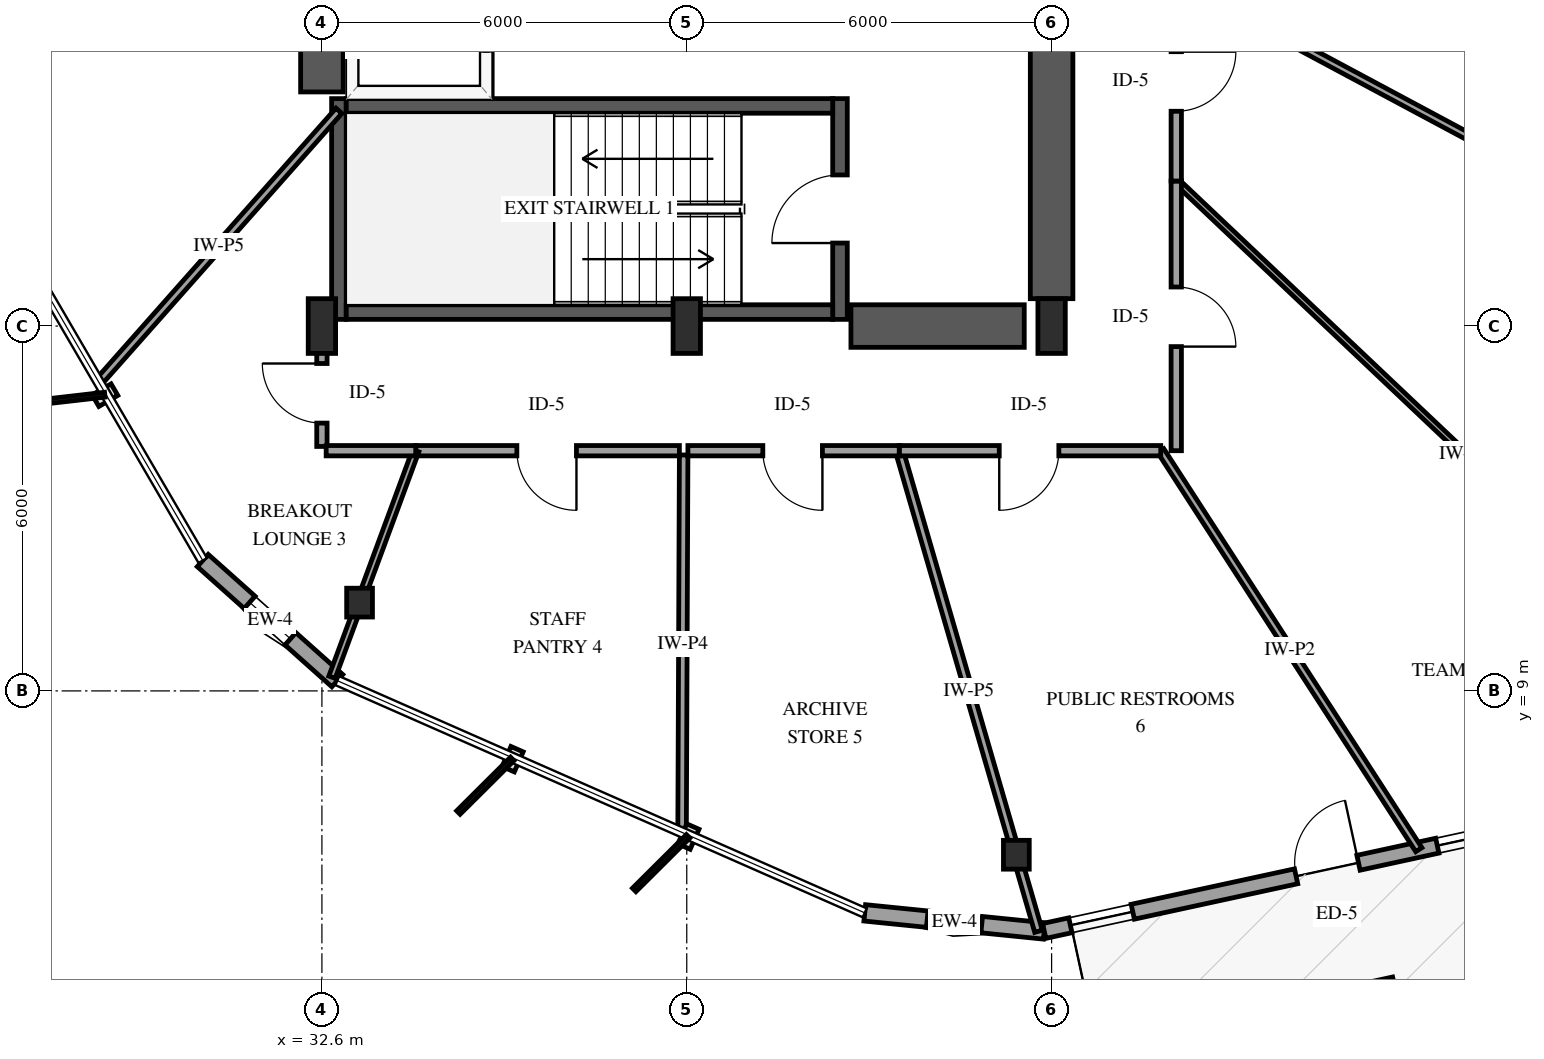
"""IFC4 building model, lengths in metres.
Left out: names, types, materials, properties, quantities, classifications, styles, units other than length and angle.
Written with IfcOpenShell. Run it as: python <this file> out.ifc"""

import sys

from ifc_helpers import new_model, si_unit, direction, frame, frame_2d, origin, origin_2d, place, context, subcontext, project, spatial, rectangle, i_section, extrude, element, fill, save


model = new_model("IFC4")
c1 = context("Model", 3, precision=1e-05, world=origin(), true_north=direction((0.0, 1.0)))
c2 = subcontext(c1, "Body", "Model", "MODEL_VIEW")
j1 = project(units=[si_unit("LENGTHUNIT", "METRE"), si_unit("PLANEANGLEUNIT", "RADIAN")], contexts=[c1])
p1 = place(None, origin())
s1 = spatial("IfcSite", under=j1, at=p1, CompositionType="ELEMENT")
p2 = place(p1, origin())
s2 = spatial("IfcBuilding", under=s1, at=p2, CompositionType="ELEMENT")
p3 = place(p2, frame((0.0, 0.0, 74.6)))
s3 = spatial("IfcBuildingStorey", under=s2, at=p3, CompositionType="ELEMENT", Elevation=74.6)
p4 = place(p3, frame((32.88, 15.11, 0.0), z_axis=(0.0, 0.0, 1.0), x_axis=(0.0, 1.0, 0.0)))
e1 = element("IfcWall", 1, at=p4, inside=s3, PredefinedType="SHEAR", context=c2, shape_type="SweptSolid", body=[
    extrude(rectangle(XDim=3.63, YDim=0.24, at=frame_2d((1.815, 0.0))), origin(), (0.0, 0.0, 1.0), 4.0),
])
p5 = place(p3, frame((41.12, 15.11, 0.0), z_axis=(0.0, 0.0, 1.0), x_axis=(0.0, 1.0, 0.0)))
e2 = element("IfcWall", 2, at=p5, inside=s3, PredefinedType="SHEAR", context=c2, shape_type="SweptSolid", body=[
    extrude(rectangle(XDim=3.63, YDim=0.24, at=frame_2d((1.815, 0.0))), origin(), (0.0, 0.0, 1.0), 4.0),
])
p6 = place(p5, frame((1.255, 0.0, 0.0)))
e3 = element("IfcOpeningElement", 3, at=p6, cuts=e2, PredefinedType="OPENING", context=c2, shape_type="SweptSolid", body=[
    extrude(rectangle(XDim=1.12, YDim=2.15, at=frame_2d((0.56, 1.075))), frame((0.0, 0.13, 0.0), z_axis=(0.0, -1.0, 0.0), x_axis=(1.0, 0.0, 0.0)), (0.0, 0.0, 1.0), 0.26),
])
for number, where, z_axis, x_axis in (
    (4, (33.0, 15.23, 0.0), (0.0, 0.0, 1.0), (1.0, 0.0, 0.0)),
    (5, (33.0, 18.62, 0.0), (0.0, 0.0, 1.0), (1.0, 0.0, 0.0)),
):
    element("IfcWall", number, at=place(p3, frame(where, z_axis=z_axis, x_axis=x_axis)), inside=s3, PredefinedType="SHEAR", context=c2, shape_type="SweptSolid", body=[
        extrude(rectangle(XDim=8.0, YDim=0.24, at=frame_2d((4.0, 0.0))), origin(), (0.0, 0.0, 1.0), 4.0),
    ])
p7 = place(p3, frame((32.6, 18.85, 0.0), z_axis=(0.0, 0.0, 1.0), x_axis=(0.0, 1.0, 0.0)))
e6 = element("IfcWall", 6, at=p7, inside=s3, PredefinedType="SHEAR", context=c2, shape_type="SweptSolid", body=[
    extrude(rectangle(XDim=12.3, YDim=0.7, at=frame_2d((6.15, 0.0))), origin(), (0.0, 0.0, 1.0), 4.0),
])
p8 = place(p3, frame((41.3, 15.0, 0.0), z_axis=(0.0, 0.0, 1.0), x_axis=(1.0, 0.0, 0.0)))
e7 = element("IfcWall", 7, at=p8, inside=s3, PredefinedType="SHEAR", context=c2, shape_type="SweptSolid", body=[
    extrude(rectangle(XDim=2.85, YDim=0.7, at=frame_2d((1.425, 0.0))), origin(), (0.0, 0.0, 1.0), 4.0),
])
p9 = place(p3, frame((44.6, 15.45, 0.0), z_axis=(0.0, 0.0, 1.0), x_axis=(0.0, 1.0, 0.0)))
e8 = element("IfcWall", 8, at=p9, inside=s3, PredefinedType="SHEAR", context=c2, shape_type="SweptSolid", body=[
    extrude(rectangle(XDim=6.35, YDim=0.7, at=frame_2d((3.175, 0.0))), origin(), (0.0, 0.0, 1.0), 4.0),
])
for number, where, z_axis, x_axis in (
    (9, (32.6, 15.0, 0.0), (0.0, 0.0, 1.0), (1.0, 0.0, 0.0)),
    (10, (38.6, 15.0, 0.0), (0.0, 0.0, 1.0), (1.0, 0.0, 0.0)),
    (11, (44.6, 15.0, 0.0), (0.0, 0.0, 1.0), (1.0, 0.0, 0.0)),
):
    element("IfcColumn", number, at=place(p3, frame(where, z_axis=z_axis, x_axis=x_axis)), inside=s3, PredefinedType="PILASTER", context=c2, shape_type="SweptSolid", body=[
        extrude(rectangle(XDim=0.45, YDim=0.9, at=origin_2d()), origin(), (0.0, 0.0, 1.0), 4.0),
    ])
for number, where, z_axis, x_axis in (
    (12, (33.219, 10.452, 0.0), (0.0, 0.0, 1.0), (1.0, 0.0, 0.0)),
    (13, (44.02, 6.306, 0.0), (0.0, 0.0, 1.0), (1.0, 0.0, 0.0)),
):
    element("IfcColumn", number, at=place(p3, frame(where, z_axis=z_axis, x_axis=x_axis)), inside=s3, PredefinedType="COLUMN", context=c2, shape_type="SweptSolid", body=[
        extrude(i_section(OverallWidth=0.424, OverallDepth=0.474, WebThickness=0.048, FlangeThickness=0.077, FilletRadius=0.038, at=origin_2d()), origin(), (0.0, 0.0, 1.0), 4.0),
    ])
p10 = place(p3, frame((30.64, 11.144, 0.0), z_axis=(0.0, 0.0, 1.0), x_axis=(0.745968322864, -0.665981427131, 0.0)))
e14 = element("IfcWall", 14, at=p10, inside=s3, PredefinedType="SOLIDWALL", context=c2, shape_type="SweptSolid", body=[
    extrude(rectangle(XDim=2.967, YDim=0.27, at=frame_2d((1.483, 0.0))), origin(), (0.0, 0.0, 1.0), 3.079),
])
p11 = place(p10, frame((1.033, 0.0, 0.75)))
e15 = element("IfcOpeningElement", 15, at=p11, cuts=e14, PredefinedType="OPENING", context=c2, shape_type="SweptSolid", body=[
    extrude(rectangle(XDim=0.9, YDim=1.5, at=frame_2d((0.45, 0.75))), frame((0.0, 0.145, 0.0), z_axis=(0.0, -1.0, 0.0), x_axis=(1.0, 0.0, 0.0)), (0.0, 0.0, 1.0), 0.29),
])
p12 = place(p3, frame((41.527, 5.35, 0.0), z_axis=(0.0, 0.0, 1.0), x_axis=(0.994955375676, -0.100318494868, 0.0)))
e16 = element("IfcWall", 16, at=p12, inside=s3, PredefinedType="SOLIDWALL", context=c2, shape_type="SweptSolid", body=[
    extrude(rectangle(XDim=2.967, YDim=0.27, at=frame_2d((1.483, 0.0))), origin(), (0.0, 0.0, 1.0), 3.079),
])
p13 = place(p12, frame((1.033, 0.0, 0.75)))
e17 = element("IfcOpeningElement", 17, at=p13, cuts=e16, PredefinedType="OPENING", context=c2, shape_type="SweptSolid", body=[
    extrude(rectangle(XDim=0.9, YDim=1.5, at=frame_2d((0.45, 0.75))), frame((0.0, 0.145, 0.0), z_axis=(0.0, -1.0, 0.0), x_axis=(1.0, 0.0, 0.0)), (0.0, 0.0, 1.0), 0.29),
])
p14 = place(p3, frame((44.479, 5.052, 0.0), z_axis=(0.0, 0.0, 1.0), x_axis=(0.977271129169, 0.211993254829, 0.0)))
e18 = element("IfcWall", 18, at=p14, inside=s3, PredefinedType="SOLIDWALL", context=c2, shape_type="SweptSolid", body=[
    extrude(rectangle(XDim=9.477, YDim=0.25, at=frame_2d((4.738, 0.0))), origin(), (0.0, 0.0, 1.0), 3.079),
])
p15 = place(p14, frame((4.239, 0.0, 0.0)))
e19 = element("IfcOpeningElement", 19, at=p15, cuts=e18, PredefinedType="OPENING", context=c2, shape_type="SweptSolid", body=[
    extrude(rectangle(XDim=1.05, YDim=2.15, at=frame_2d((0.525, 1.075))), frame((0.0, 0.135, 0.0), z_axis=(0.0, -1.0, 0.0), x_axis=(1.0, 0.0, 0.0)), (0.0, 0.0, 1.0), 0.27),
])
p16 = place(p14, frame((0.44, 0.0, 0.72)))
e20 = element("IfcOpeningElement", 20, at=p16, cuts=e18, PredefinedType="OPENING", context=c2, shape_type="SweptSolid", body=[
    extrude(rectangle(XDim=1.05, YDim=1.55, at=frame_2d((0.525, 0.775))), frame((0.0, 0.135, 0.0), z_axis=(0.0, -1.0, 0.0), x_axis=(1.0, 0.0, 0.0)), (0.0, 0.0, 1.0), 0.27),
])
p17 = place(p14, frame((6.615, 0.0, 0.72)))
e21 = element("IfcOpeningElement", 21, at=p17, cuts=e18, PredefinedType="OPENING", context=c2, shape_type="SweptSolid", body=[
    extrude(rectangle(XDim=1.05, YDim=1.55, at=frame_2d((0.525, 0.775))), frame((0.0, 0.135, 0.0), z_axis=(0.0, -1.0, 0.0), x_axis=(1.0, 0.0, 0.0)), (0.0, 0.0, 1.0), 0.27),
])
p18 = place(p3, frame((35.3, 18.79, 0.0), z_axis=(0.0, 0.0, 1.0), x_axis=(0.0, 1.0, 0.0)))
e22 = element("IfcWall", 22, at=p18, inside=s3, PredefinedType="SOLIDWALL", context=c2, shape_type="SweptSolid", body=[
    extrude(rectangle(XDim=2.55, YDim=0.2, at=frame_2d((1.275, 0.0))), origin(), (0.0, 0.0, 1.0), 3.7),
])
p19 = place(p18, frame((0.725, 0.0, 0.0)))
e23 = element("IfcOpeningElement", 23, at=p19, cuts=e22, PredefinedType="OPENING", context=c2, shape_type="SweptSolid", body=[
    extrude(rectangle(XDim=1.1, YDim=2.15, at=frame_2d((0.55, 1.075))), frame((0.0, 0.11, 0.0), z_axis=(0.0, -1.0, 0.0), x_axis=(1.0, 0.0, 0.0)), (0.0, 0.0, 1.0), 0.22),
])
p20 = place(p3, frame((46.65, 22.738, 0.0), z_axis=(0.0, 0.0, 1.0), x_axis=(0.96272520574, -0.270481382415, 0.0)))
e24 = element("IfcWall", 24, at=p20, inside=s3, PredefinedType="PARTITIONING", context=c2, shape_type="SweptSolid", body=[
    extrude(rectangle(XDim=17.717, YDim=0.14, at=frame_2d((8.858, 0.0))), origin(), (0.0, 0.0, 1.0), 2.995),
])
p21 = place(p3, frame((46.65, 20.689, 0.0), z_axis=(0.0, 0.0, 1.0), x_axis=(0.881603902275, -0.471989999358, 0.0)))
e25 = element("IfcWall", 25, at=p21, inside=s3, PredefinedType="PARTITIONING", context=c2, shape_type="SweptSolid", body=[
    extrude(rectangle(XDim=15.723, YDim=0.12, at=frame_2d((7.861, 0.0))), origin(), (0.0, 0.0, 1.0), 3.7),
])
p22 = place(p3, frame((46.65, 17.385, 0.0), z_axis=(0.0, 0.0, 1.0), x_axis=(0.726419957341, -0.687251078993, 0.0)))
e26 = element("IfcWall", 26, at=p22, inside=s3, PredefinedType="PARTITIONING", context=c2, shape_type="SweptSolid", body=[
    extrude(rectangle(XDim=13.052, YDim=0.1, at=frame_2d((6.526, 0.0))), origin(), (0.0, 0.0, 1.0), 2.995),
])
p23 = place(p3, frame((42.094, 12.95, 0.0), z_axis=(0.0, 0.0, 1.0), x_axis=(0.278434130026, -0.960455327039, 0.0)))
e27 = element("IfcWall", 27, at=p23, inside=s3, PredefinedType="PARTITIONING", context=c2, shape_type="SweptSolid", body=[
    extrude(rectangle(XDim=8.228, YDim=0.13, at=frame_2d((4.114, 0.0))), origin(), (0.0, 0.0, 1.0), 2.995),
])
p24 = place(p3, frame((46.395, 12.95, 0.0), z_axis=(0.0, 0.0, 1.0), x_axis=(0.543117835723, -0.839656487213, 0.0)))
e28 = element("IfcWall", 28, at=p24, inside=s3, PredefinedType="PARTITIONING", context=c2, shape_type="SweptSolid", body=[
    extrude(rectangle(XDim=7.814, YDim=0.12, at=frame_2d((3.907, 0.0))), origin(), (0.0, 0.0, 1.0), 3.7),
])
p25 = place(p3, frame((38.549, 12.88, 0.0), z_axis=(0.0, 0.0, 1.0), x_axis=(-0.004208750042, -0.999991143172, 0.0)))
e29 = element("IfcWall", 29, at=p25, inside=s3, PredefinedType="PARTITIONING", context=c2, shape_type="SweptSolid", body=[
    extrude(rectangle(XDim=6.207, YDim=0.14, at=frame_2d((3.104, 0.0))), origin(), (0.0, 0.0, 1.0), 3.7),
])
p26 = place(p3, frame((32.88, 18.54, 0.0), z_axis=(0.0, 0.0, 1.0), x_axis=(-0.663098879781, -0.748531813374, 0.0)))
e30 = element("IfcWall", 30, at=p26, inside=s3, PredefinedType="PARTITIONING", context=c2, shape_type="SweptSolid", body=[
    extrude(rectangle(XDim=5.958, YDim=0.13, at=frame_2d((2.979, 0.0))), origin(), (0.0, 0.0, 1.0), 3.7),
])
p27 = place(p3, frame((46.65, 17.385, 0.0), z_axis=(0.0, 0.0, 1.0), x_axis=(0.0, -1.0, 0.0)))
e31 = element("IfcWall", 31, at=p27, inside=s3, PredefinedType="PARTITIONING", context=c2, shape_type="SweptSolid", body=[
    extrude(rectangle(XDim=4.435, YDim=0.17, at=frame_2d((2.218, 0.0))), origin(), (0.0, 0.0, 1.0), 3.7),
])
p28 = place(p27, frame((1.743, 0.0, 0.0)))
e32 = element("IfcOpeningElement", 32, at=p28, cuts=e31, PredefinedType="OPENING", context=c2, shape_type="SweptSolid", body=[
    extrude(rectangle(XDim=0.98, YDim=2.15, at=frame_2d((0.49, 1.075))), frame((0.0, 0.095, 0.0), z_axis=(0.0, -1.0, 0.0), x_axis=(1.0, 0.0, 0.0)), (0.0, 0.0, 1.0), 0.19),
])
p29 = place(p3, frame((38.479, 12.95, 0.0), z_axis=(0.0, 0.0, 1.0), x_axis=(-1.0, 0.0, 0.0)))
e33 = element("IfcWall", 33, at=p29, inside=s3, PredefinedType="PARTITIONING", context=c2, shape_type="SweptSolid", body=[
    extrude(rectangle(XDim=4.336, YDim=0.17, at=frame_2d((2.168, 0.0))), origin(), (0.0, 0.0, 1.0), 3.7),
])
p30 = place(p29, frame((1.693, 0.0, 0.0)))
e34 = element("IfcOpeningElement", 34, at=p30, cuts=e33, PredefinedType="OPENING", context=c2, shape_type="SweptSolid", body=[
    extrude(rectangle(XDim=0.98, YDim=2.15, at=frame_2d((0.49, 1.075))), frame((0.0, 0.095, 0.0), z_axis=(0.0, -1.0, 0.0), x_axis=(1.0, 0.0, 0.0)), (0.0, 0.0, 1.0), 0.19),
])
p31 = place(p3, frame((46.395, 12.95, 0.0), z_axis=(0.0, 0.0, 1.0), x_axis=(-1.0, 0.0, 0.0)))
e35 = element("IfcWall", 35, at=p31, inside=s3, PredefinedType="PARTITIONING", context=c2, shape_type="SweptSolid", body=[
    extrude(rectangle(XDim=4.301, YDim=0.17, at=frame_2d((2.15, 0.0))), origin(), (0.0, 0.0, 1.0), 3.7),
])
p32 = place(p31, frame((1.676, 0.0, 0.0)))
e36 = element("IfcOpeningElement", 36, at=p32, cuts=e35, PredefinedType="OPENING", context=c2, shape_type="SweptSolid", body=[
    extrude(rectangle(XDim=0.98, YDim=2.15, at=frame_2d((0.49, 1.075))), frame((0.0, 0.095, 0.0), z_axis=(0.0, -1.0, 0.0), x_axis=(1.0, 0.0, 0.0)), (0.0, 0.0, 1.0), 0.19),
])
p33 = place(p3, frame((34.143, 12.95, 0.0), z_axis=(0.0, 0.0, 1.0), x_axis=(-0.346733626326, -0.937963641286, 0.0)))
e37 = element("IfcWall", 37, at=p33, inside=s3, PredefinedType="PARTITIONING", context=c2, shape_type="SweptSolid", body=[
    extrude(rectangle(XDim=3.971, YDim=0.11, at=frame_2d((1.986, 0.0))), origin(), (0.0, 0.0, 1.0), 2.995),
])
p34 = place(p3, frame((42.094, 12.95, 0.0), z_axis=(0.0, 0.0, 1.0), x_axis=(-1.0, 0.0, 0.0)))
e38 = element("IfcWall", 38, at=p34, inside=s3, PredefinedType="PARTITIONING", context=c2, shape_type="SweptSolid", body=[
    extrude(rectangle(XDim=3.475, YDim=0.17, at=frame_2d((1.738, 0.0))), origin(), (0.0, 0.0, 1.0), 3.7),
])
p35 = place(p34, frame((1.263, 0.0, 0.0)))
e39 = element("IfcOpeningElement", 39, at=p35, cuts=e38, PredefinedType="OPENING", context=c2, shape_type="SweptSolid", body=[
    extrude(rectangle(XDim=0.98, YDim=2.15, at=frame_2d((0.49, 1.075))), frame((0.0, 0.095, 0.0), z_axis=(0.0, -1.0, 0.0), x_axis=(1.0, 0.0, 0.0)), (0.0, 0.0, 1.0), 0.19),
])
p36 = place(p3, frame((46.65, 20.689, 0.0), z_axis=(0.0, 0.0, 1.0), x_axis=(0.0, -1.0, 0.0)))
e40 = element("IfcWall", 40, at=p36, inside=s3, PredefinedType="PARTITIONING", context=c2, shape_type="SweptSolid", body=[
    extrude(rectangle(XDim=3.304, YDim=0.17, at=frame_2d((1.652, 0.0))), origin(), (0.0, 0.0, 1.0), 3.7),
])
p37 = place(p36, frame((1.177, 0.0, 0.0)))
e41 = element("IfcOpeningElement", 41, at=p37, cuts=e40, PredefinedType="OPENING", context=c2, shape_type="SweptSolid", body=[
    extrude(rectangle(XDim=0.98, YDim=2.15, at=frame_2d((0.49, 1.075))), frame((0.0, 0.095, 0.0), z_axis=(0.0, -1.0, 0.0), x_axis=(1.0, 0.0, 0.0)), (0.0, 0.0, 1.0), 0.19),
])
p38 = place(p3, frame((32.6, 13.02, 0.0), z_axis=(0.0, 0.0, 1.0), x_axis=(0.0, 1.0, 0.0)))
e42 = element("IfcWall", 42, at=p38, inside=s3, PredefinedType="PARTITIONING", context=c2, shape_type="SweptSolid", body=[
    extrude(rectangle(XDim=1.91, YDim=0.17, at=frame_2d((0.955, 0.0))), origin(), (0.0, 0.0, 1.0), 3.7),
])
p39 = place(p38, frame((0.384, 0.0, 0.0)))
e43 = element("IfcOpeningElement", 43, at=p39, cuts=e42, PredefinedType="OPENING", context=c2, shape_type="SweptSolid", body=[
    extrude(rectangle(XDim=0.98, YDim=2.15, at=frame_2d((0.49, 1.075))), frame((0.0, 0.095, 0.0), z_axis=(0.0, -1.0, 0.0), x_axis=(1.0, 0.0, 0.0)), (0.0, 0.0, 1.0), 0.19),
])
p40 = place(p3, frame((34.143, 12.95, 0.0), z_axis=(0.0, 0.0, 1.0), x_axis=(-1.0, 0.0, 0.0)))
e44 = element("IfcWall", 44, at=p40, inside=s3, PredefinedType="PARTITIONING", context=c2, shape_type="SweptSolid", body=[
    extrude(rectangle(XDim=1.473, YDim=0.17, at=frame_2d((0.737, 0.0))), origin(), (0.0, 0.0, 1.0), 3.7),
])
p41 = place(p11, origin())
e45 = element("IfcWindow", 45, at=p41, inside=s3, PartitioningType="SINGLE_PANEL", PredefinedType="WINDOW", context=c2, shape_type="SweptSolid", body=[
    extrude(rectangle(XDim=0.9, YDim=1.5, at=frame_2d((0.45, 0.75))), frame((0.0, 0.03, 0.0), z_axis=(0.0, -1.0, 0.0), x_axis=(1.0, 0.0, 0.0)), (0.0, 0.0, 1.0), 0.06),
])
fill(e15, e45)
p42 = place(p13, origin())
e46 = element("IfcWindow", 46, at=p42, inside=s3, PartitioningType="SINGLE_PANEL", PredefinedType="WINDOW", context=c2, shape_type="SweptSolid", body=[
    extrude(rectangle(XDim=0.9, YDim=1.5, at=frame_2d((0.45, 0.75))), frame((0.0, 0.03, 0.0), z_axis=(0.0, -1.0, 0.0), x_axis=(1.0, 0.0, 0.0)), (0.0, 0.0, 1.0), 0.06),
])
fill(e17, e46)
p43 = place(p15, origin())
e47 = element("IfcDoor", 47, at=p43, inside=s3, OperationType="SINGLE_SWING_RIGHT", PredefinedType="DOOR", context=c2, shape_type="SweptSolid", body=[
    extrude(rectangle(XDim=1.05, YDim=2.15, at=frame_2d((0.525, 1.075))), frame((0.0, 0.025, 0.0), z_axis=(0.0, -1.0, 0.0), x_axis=(1.0, 0.0, 0.0)), (0.0, 0.0, 1.0), 0.05),
])
fill(e19, e47)
p44 = place(p16, origin())
e48 = element("IfcWindow", 48, at=p44, inside=s3, PartitioningType="SINGLE_PANEL", PredefinedType="WINDOW", context=c2, shape_type="SweptSolid", body=[
    extrude(rectangle(XDim=1.05, YDim=1.55, at=frame_2d((0.525, 0.775))), frame((0.0, 0.03, 0.0), z_axis=(0.0, -1.0, 0.0), x_axis=(1.0, 0.0, 0.0)), (0.0, 0.0, 1.0), 0.06),
])
fill(e20, e48)
p45 = place(p17, origin())
e49 = element("IfcWindow", 49, at=p45, inside=s3, PartitioningType="SINGLE_PANEL", PredefinedType="WINDOW", context=c2, shape_type="SweptSolid", body=[
    extrude(rectangle(XDim=1.05, YDim=1.55, at=frame_2d((0.525, 0.775))), frame((0.0, 0.03, 0.0), z_axis=(0.0, -1.0, 0.0), x_axis=(1.0, 0.0, 0.0)), (0.0, 0.0, 1.0), 0.06),
])
fill(e21, e49)
p46 = place(p6, origin())
e50 = element("IfcDoor", 50, at=p46, inside=s3, OperationType="SINGLE_SWING_LEFT", PredefinedType="DOOR", context=c2, shape_type="SweptSolid", body=[
    extrude(rectangle(XDim=1.12, YDim=2.15, at=frame_2d((0.56, 1.075))), frame((0.0, 0.025, 0.0), z_axis=(0.0, -1.0, 0.0), x_axis=(1.0, 0.0, 0.0)), (0.0, 0.0, 1.0), 0.05),
])
fill(e3, e50)
p47 = place(p28, origin())
e51 = element("IfcDoor", 51, at=p47, inside=s3, OperationType="SINGLE_SWING_RIGHT", PredefinedType="DOOR", context=c2, shape_type="SweptSolid", body=[
    extrude(rectangle(XDim=0.98, YDim=2.15, at=frame_2d((0.49, 1.075))), frame((0.0, 0.025, 0.0), z_axis=(0.0, -1.0, 0.0), x_axis=(1.0, 0.0, 0.0)), (0.0, 0.0, 1.0), 0.05),
])
fill(e32, e51)
p48 = place(p30, origin())
e52 = element("IfcDoor", 52, at=p48, inside=s3, OperationType="SINGLE_SWING_LEFT", PredefinedType="DOOR", context=c2, shape_type="SweptSolid", body=[
    extrude(rectangle(XDim=0.98, YDim=2.15, at=frame_2d((0.49, 1.075))), frame((0.0, 0.025, 0.0), z_axis=(0.0, -1.0, 0.0), x_axis=(1.0, 0.0, 0.0)), (0.0, 0.0, 1.0), 0.05),
])
fill(e34, e52)
p49 = place(p32, origin())
e53 = element("IfcDoor", 53, at=p49, inside=s3, OperationType="SINGLE_SWING_RIGHT", PredefinedType="DOOR", context=c2, shape_type="SweptSolid", body=[
    extrude(rectangle(XDim=0.98, YDim=2.15, at=frame_2d((0.49, 1.075))), frame((0.0, 0.025, 0.0), z_axis=(0.0, -1.0, 0.0), x_axis=(1.0, 0.0, 0.0)), (0.0, 0.0, 1.0), 0.05),
])
fill(e36, e53)
p50 = place(p35, origin())
e54 = element("IfcDoor", 54, at=p50, inside=s3, OperationType="SINGLE_SWING_LEFT", PredefinedType="DOOR", context=c2, shape_type="SweptSolid", body=[
    extrude(rectangle(XDim=0.98, YDim=2.15, at=frame_2d((0.49, 1.075))), frame((0.0, 0.025, 0.0), z_axis=(0.0, -1.0, 0.0), x_axis=(1.0, 0.0, 0.0)), (0.0, 0.0, 1.0), 0.05),
])
fill(e39, e54)
p51 = place(p37, origin())
e55 = element("IfcDoor", 55, at=p51, inside=s3, OperationType="SINGLE_SWING_LEFT", PredefinedType="DOOR", context=c2, shape_type="SweptSolid", body=[
    extrude(rectangle(XDim=0.98, YDim=2.15, at=frame_2d((0.49, 1.075))), frame((0.0, 0.025, 0.0), z_axis=(0.0, -1.0, 0.0), x_axis=(1.0, 0.0, 0.0)), (0.0, 0.0, 1.0), 0.05),
])
fill(e41, e55)
p52 = place(p39, origin())
e56 = element("IfcDoor", 56, at=p52, inside=s3, OperationType="SINGLE_SWING_RIGHT", PredefinedType="DOOR", context=c2, shape_type="SweptSolid", body=[
    extrude(rectangle(XDim=0.98, YDim=2.15, at=frame_2d((0.49, 1.075))), frame((0.0, 0.025, 0.0), z_axis=(0.0, -1.0, 0.0), x_axis=(1.0, 0.0, 0.0)), (0.0, 0.0, 1.0), 0.05),
])
fill(e43, e56)
save(model, sys.argv[1])
